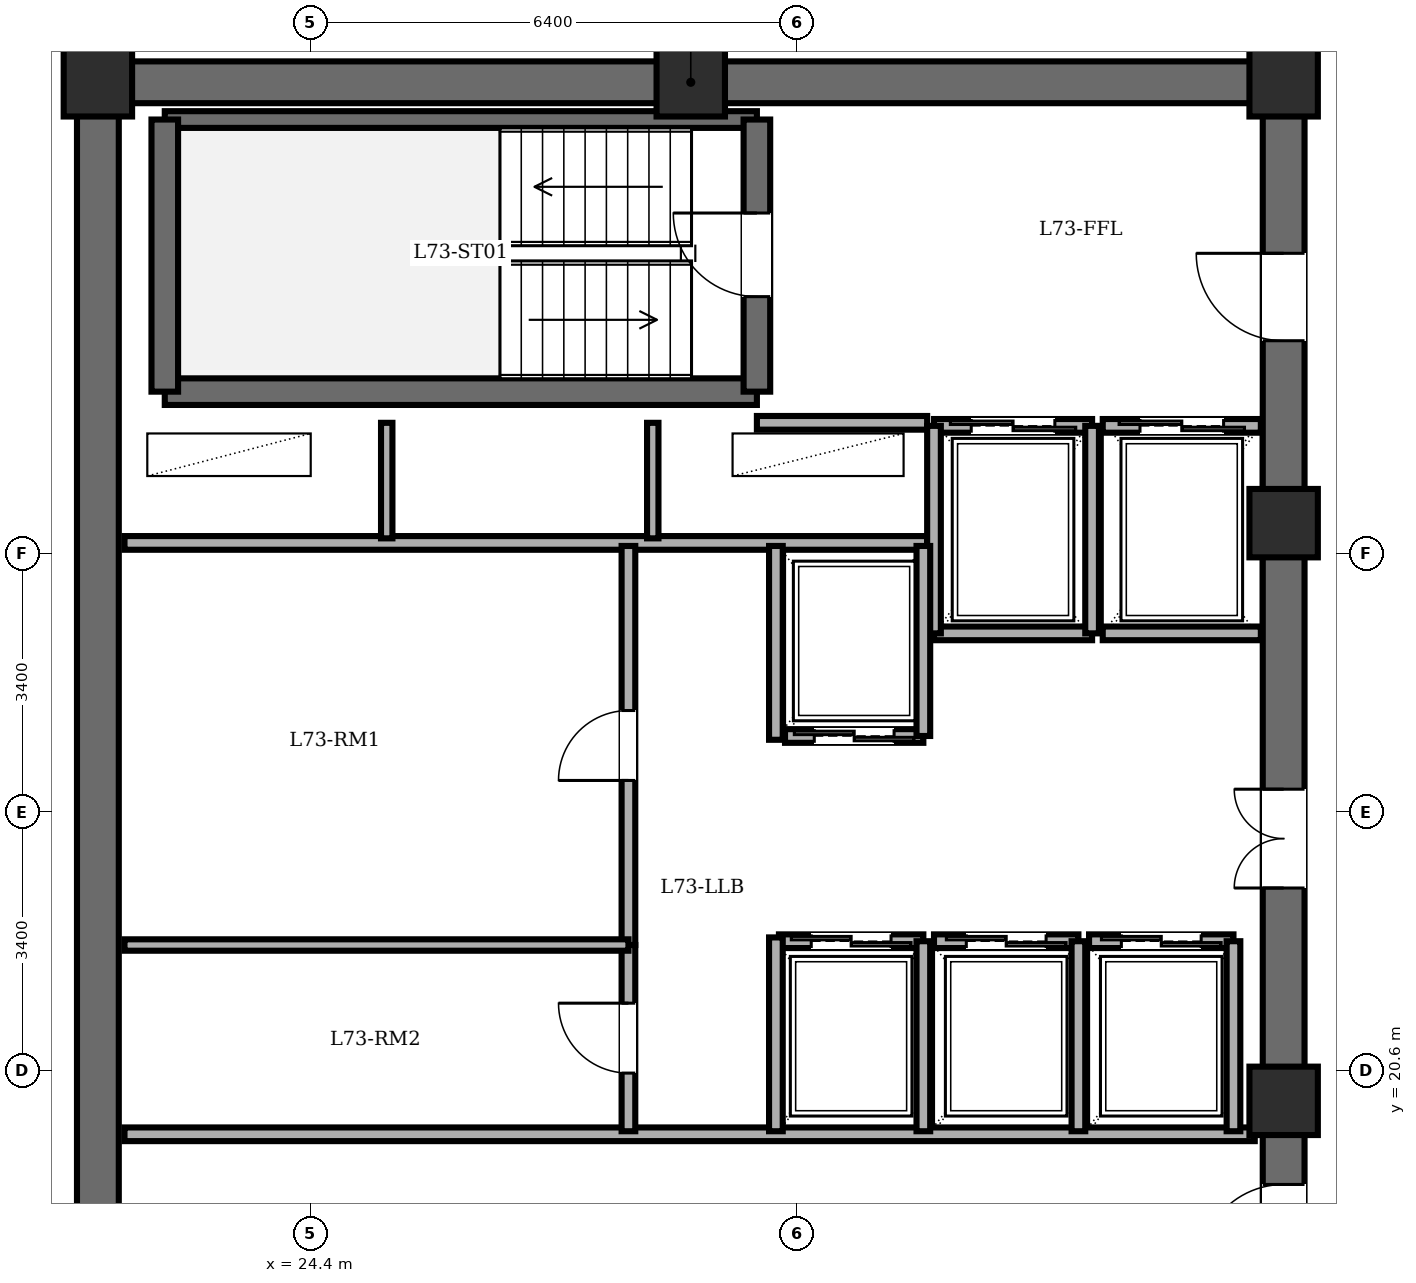
"""IFC4 building model, lengths in metres.
Left out: names, types, materials, properties, quantities, classifications, styles, units other than length and angle.
Written with IfcOpenShell. Run it as: python <this file> out.ifc"""

import sys

from ifc_helpers import new_model, si_unit, direction, frame, frame_2d, origin, origin_2d, place, context, subcontext, project, spatial, rectangle, extrude, element, fill, save


model = new_model("IFC4")
c1 = context("Model", 3, precision=1e-05, world=origin(), true_north=direction((0.0, 1.0)))
c2 = subcontext(c1, "Body", "Model", "MODEL_VIEW")
j1 = project(units=[si_unit("LENGTHUNIT", "METRE"), si_unit("PLANEANGLEUNIT", "RADIAN")], contexts=[c1])
p1 = place(None, origin())
s1 = spatial("IfcSite", under=j1, at=p1, CompositionType="ELEMENT")
p2 = place(p1, origin())
s2 = spatial("IfcBuilding", under=s1, at=p2, CompositionType="ELEMENT")
p3 = place(p2, frame((0.0, 0.0, 280.7)))
s3 = spatial("IfcBuildingStorey", under=s2, at=p3, CompositionType="ELEMENT", Elevation=280.7)
for number, where, z_axis, x_axis in (
    (1, (37.2, 20.2, 0.0), (0.0, 0.0, 1.0), (1.0, 0.0, 0.0)),
    (2, (37.2, 27.8, 0.0), (0.0, 0.0, 1.0), (1.0, 0.0, 0.0)),
    (3, (37.2, 33.6, 0.0), (0.0, 0.0, 1.0), (1.0, 0.0, 0.0)),
    (4, (29.4, 33.6, 0.0), (0.0, 0.0, 1.0), (1.0, 0.0, 0.0)),
    (5, (21.6, 33.6, 0.0), (0.0, 0.0, 1.0), (1.0, 0.0, 0.0)),
):
    element("IfcColumn", number, at=place(p3, frame(where, z_axis=z_axis, x_axis=x_axis)), inside=s3, PredefinedType="COLUMN", context=c2, shape_type="SweptSolid", body=[
        extrude(rectangle(XDim=0.9, YDim=0.9, at=origin_2d()), origin(), (0.0, 0.0, 1.0), 3.65),
    ])
p4 = place(p3, frame((21.6, 14.4, 0.0), z_axis=(0.0, 0.0, 1.0), x_axis=(0.0, 1.0, 0.0)))
e6 = element("IfcWall", 6, at=p4, inside=s3, PredefinedType="SHEAR", context=c2, shape_type="SweptSolid", body=[
    extrude(rectangle(XDim=19.2, YDim=0.55, at=frame_2d((9.6, 0.0))), origin(), (0.0, 0.0, 1.0), 3.45),
])
p5 = place(p3, frame((21.6, 33.6, 0.0), z_axis=(0.0, 0.0, 1.0), x_axis=(1.0, 0.0, 0.0)))
e7 = element("IfcWall", 7, at=p5, inside=s3, PredefinedType="SHEAR", context=c2, shape_type="SweptSolid", body=[
    extrude(rectangle(XDim=15.6, YDim=0.55, at=frame_2d((7.8, 0.0))), origin(), (0.0, 0.0, 1.0), 3.45),
])
p6 = place(p3, frame((37.2, 14.4, 0.0), z_axis=(0.0, 0.0, 1.0), x_axis=(0.0, 1.0, 0.0)))
e8 = element("IfcWall", 8, at=p6, inside=s3, PredefinedType="SHEAR", context=c2, shape_type="SweptSolid", body=[
    extrude(rectangle(XDim=19.2, YDim=0.55, at=frame_2d((9.6, 0.0))), origin(), (0.0, 0.0, 1.0), 3.45),
])
p7 = place(p6, frame((15.8, 0.0, 0.0)))
e9 = element("IfcOpeningElement", 9, at=p7, cuts=e8, PredefinedType="OPENING", context=c2, shape_type="SweptSolid", body=[
    extrude(rectangle(XDim=1.15, YDim=2.15, at=frame_2d((0.575, 1.075))), frame((0.0, 0.285, 0.0), z_axis=(0.0, -1.0, 0.0), x_axis=(1.0, 0.0, 0.0)), (0.0, 0.0, 1.0), 0.57),
])
p8 = place(p6, frame((3.6, 0.0, 0.0)))
e10 = element("IfcOpeningElement", 10, at=p8, cuts=e8, PredefinedType="OPENING", context=c2, shape_type="SweptSolid", body=[
    extrude(rectangle(XDim=1.1, YDim=2.15, at=frame_2d((0.55, 1.075))), frame((0.0, 0.285, 0.0), z_axis=(0.0, -1.0, 0.0), x_axis=(1.0, 0.0, 0.0)), (0.0, 0.0, 1.0), 0.57),
])
p9 = place(p6, frame((8.6, 0.0, 0.0)))
e11 = element("IfcOpeningElement", 11, at=p9, cuts=e8, PredefinedType="OPENING", context=c2, shape_type="SweptSolid", body=[
    extrude(rectangle(XDim=1.3, YDim=2.2, at=frame_2d((0.65, 1.1))), frame((0.0, 0.285, 0.0), z_axis=(0.0, -1.0, 0.0), x_axis=(1.0, 0.0, 0.0)), (0.0, 0.0, 1.0), 0.57),
])
p10 = place(p3, frame((22.48, 29.53, 0.0), z_axis=(0.0, 0.0, 1.0), x_axis=(1.0, 0.0, 0.0)))
e12 = element("IfcWall", 12, at=p10, inside=s3, PredefinedType="SOLIDWALL", context=c2, shape_type="SweptSolid", body=[
    extrude(rectangle(XDim=7.79, YDim=0.35, at=frame_2d((3.895, 0.0))), origin(), (0.0, 0.0, 1.0), 3.45),
])
p11 = place(p3, frame((22.48, 33.11, 0.0), z_axis=(0.0, 0.0, 1.0), x_axis=(1.0, 0.0, 0.0)))
e13 = element("IfcWall", 13, at=p11, inside=s3, PredefinedType="PARTITIONING", context=c2, shape_type="SweptSolid", body=[
    extrude(rectangle(XDim=7.79, YDim=0.22, at=frame_2d((3.895, 0.0))), origin(), (0.0, 0.0, 1.0), 3.45),
])
p12 = place(p3, frame((22.48, 29.53, 0.0), z_axis=(0.0, 0.0, 1.0), x_axis=(0.0, 1.0, 0.0)))
e14 = element("IfcWall", 14, at=p12, inside=s3, PredefinedType="SOLIDWALL", context=c2, shape_type="SweptSolid", body=[
    extrude(rectangle(XDim=3.58, YDim=0.35, at=frame_2d((1.79, 0.0))), origin(), (0.0, 0.0, 1.0), 3.45),
])
p13 = place(p3, frame((30.27, 29.53, 0.0), z_axis=(0.0, 0.0, 1.0), x_axis=(0.0, 1.0, 0.0)))
e15 = element("IfcWall", 15, at=p13, inside=s3, PredefinedType="SOLIDWALL", context=c2, shape_type="SweptSolid", body=[
    extrude(rectangle(XDim=3.58, YDim=0.35, at=frame_2d((1.79, 0.0))), origin(), (0.0, 0.0, 1.0), 3.45),
])
p14 = place(p13, frame((1.25, 0.0, 0.0)))
e16 = element("IfcOpeningElement", 16, at=p14, cuts=e15, PredefinedType="OPENING", context=c2, shape_type="SweptSolid", body=[
    extrude(rectangle(XDim=1.1, YDim=2.15, at=frame_2d((0.55, 1.075))), frame((0.0, 0.185, 0.0), z_axis=(0.0, -1.0, 0.0), x_axis=(1.0, 0.0, 0.0)), (0.0, 0.0, 1.0), 0.37),
])
p15 = place(p3, frame((30.27, 29.12, 0.0), z_axis=(0.0, 0.0, 1.0), x_axis=(1.0, 0.0, 0.0)))
e17 = element("IfcWall", 17, at=p15, inside=s3, PredefinedType="PARTITIONING", context=c2, shape_type="SweptSolid", body=[
    extrude(rectangle(XDim=2.24, YDim=0.18, at=frame_2d((1.12, 0.0))), origin(), (0.0, 0.0, 1.0), 3.45),
])
p16 = place(p3, frame((21.95, 27.54, 0.0), z_axis=(0.0, 0.0, 1.0), x_axis=(1.0, 0.0, 0.0)))
e18 = element("IfcWall", 18, at=p16, inside=s3, PredefinedType="PARTITIONING", context=c2, shape_type="SweptSolid", body=[
    extrude(rectangle(XDim=10.56, YDim=0.18, at=frame_2d((5.28, 0.0))), origin(), (0.0, 0.0, 1.0), 3.45),
])
for number, where, z_axis, x_axis in (
    (19, (25.4, 27.6, 0.0), (0.0, 0.0, 1.0), (0.0, 1.0, 0.0)),
    (20, (28.9, 27.6, 0.0), (0.0, 0.0, 1.0), (0.0, 1.0, 0.0)),
):
    element("IfcWall", number, at=place(p3, frame(where, z_axis=z_axis, x_axis=x_axis)), inside=s3, PredefinedType="PARTITIONING", context=c2, shape_type="SweptSolid", body=[
        extrude(rectangle(XDim=1.52, YDim=0.15, at=frame_2d((0.76, 0.0))), origin(), (0.0, 0.0, 1.0), 3.45),
    ])
p17 = place(p3, frame((21.95, 19.76, 0.0), z_axis=(0.0, 0.0, 1.0), x_axis=(1.0, 0.0, 0.0)))
e21 = element("IfcWall", 21, at=p17, inside=s3, PredefinedType="PARTITIONING", context=c2, shape_type="SweptSolid", body=[
    extrude(rectangle(XDim=14.87, YDim=0.18, at=frame_2d((7.435, 0.0))), origin(), (0.0, 0.0, 1.0), 3.45),
])
p18 = place(p3, frame((32.6, 29.08, 0.0), z_axis=(0.0, 0.0, 1.0), x_axis=(1.0, 0.0, 0.0)))
e22 = element("IfcWall", 22, at=p18, inside=s3, PredefinedType="PARTITIONING", context=c2, shape_type="SweptSolid", body=[
    extrude(rectangle(XDim=2.08, YDim=0.18, at=frame_2d((1.04, 0.0))), origin(), (0.0, 0.0, 1.0), 3.45),
])
p19 = place(p18, frame((0.49, 0.0, 0.0)))
e23 = element("IfcOpeningElement", 23, at=p19, cuts=e22, PredefinedType="OPENING", context=c2, shape_type="SweptSolid", body=[
    extrude(rectangle(XDim=1.1, YDim=2.2, at=frame_2d((0.55, 1.1))), frame((0.0, 0.1, 0.0), z_axis=(0.0, -1.0, 0.0), x_axis=(1.0, 0.0, 0.0)), (0.0, 0.0, 1.0), 0.2),
])
p20 = place(p3, frame((34.68, 26.35, 0.0), z_axis=(0.0, 0.0, 1.0), x_axis=(-1.0, 0.0, 0.0)))
e24 = element("IfcWall", 24, at=p20, inside=s3, PredefinedType="PARTITIONING", context=c2, shape_type="SweptSolid", body=[
    extrude(rectangle(XDim=2.08, YDim=0.18, at=frame_2d((1.04, 0.0))), origin(), (0.0, 0.0, 1.0), 3.45),
])
for number, where, z_axis, x_axis in (
    (25, (34.68, 26.35, 0.0), (0.0, 0.0, 1.0), (0.0, 1.0, 0.0)),
    (26, (32.6, 29.08, 0.0), (0.0, 0.0, 1.0), (0.0, -1.0, 0.0)),
):
    element("IfcWall", number, at=place(p3, frame(where, z_axis=z_axis, x_axis=x_axis)), inside=s3, PredefinedType="PARTITIONING", context=c2, shape_type="SweptSolid", body=[
        extrude(rectangle(XDim=2.73, YDim=0.18, at=frame_2d((1.365, 0.0))), origin(), (0.0, 0.0, 1.0), 3.45),
    ])
p21 = place(p3, frame((34.82, 29.08, 0.0), z_axis=(0.0, 0.0, 1.0), x_axis=(1.0, 0.0, 0.0)))
e27 = element("IfcWall", 27, at=p21, inside=s3, PredefinedType="PARTITIONING", context=c2, shape_type="SweptSolid", body=[
    extrude(rectangle(XDim=2.08, YDim=0.18, at=frame_2d((1.04, 0.0))), origin(), (0.0, 0.0, 1.0), 3.45),
])
p22 = place(p21, frame((0.49, 0.0, 0.0)))
e28 = element("IfcOpeningElement", 28, at=p22, cuts=e27, PredefinedType="OPENING", context=c2, shape_type="SweptSolid", body=[
    extrude(rectangle(XDim=1.1, YDim=2.2, at=frame_2d((0.55, 1.1))), frame((0.0, 0.1, 0.0), z_axis=(0.0, -1.0, 0.0), x_axis=(1.0, 0.0, 0.0)), (0.0, 0.0, 1.0), 0.2),
])
p23 = place(p3, frame((36.9, 26.35, 0.0), z_axis=(0.0, 0.0, 1.0), x_axis=(-1.0, 0.0, 0.0)))
e29 = element("IfcWall", 29, at=p23, inside=s3, PredefinedType="PARTITIONING", context=c2, shape_type="SweptSolid", body=[
    extrude(rectangle(XDim=2.08, YDim=0.18, at=frame_2d((1.04, 0.0))), origin(), (0.0, 0.0, 1.0), 3.45),
])
p24 = place(p3, frame((32.46, 25.0, 0.0), z_axis=(0.0, 0.0, 1.0), x_axis=(-1.0, 0.0, 0.0)))
e30 = element("IfcWall", 30, at=p24, inside=s3, PredefinedType="PARTITIONING", context=c2, shape_type="SweptSolid", body=[
    extrude(rectangle(XDim=1.82, YDim=0.18, at=frame_2d((0.91, 0.0))), origin(), (0.0, 0.0, 1.0), 3.45),
])
p25 = place(p24, frame((0.385, 0.0, 0.0)))
e31 = element("IfcOpeningElement", 31, at=p25, cuts=e30, PredefinedType="OPENING", context=c2, shape_type="SweptSolid", body=[
    extrude(rectangle(XDim=1.05, YDim=2.2, at=frame_2d((0.525, 1.1))), frame((0.0, 0.1, 0.0), z_axis=(0.0, -1.0, 0.0), x_axis=(1.0, 0.0, 0.0)), (0.0, 0.0, 1.0), 0.2),
])
p26 = place(p3, frame((32.46, 25.0, 0.0), z_axis=(0.0, 0.0, 1.0), x_axis=(0.0, 1.0, 0.0)))
e32 = element("IfcWall", 32, at=p26, inside=s3, PredefinedType="PARTITIONING", context=c2, shape_type="SweptSolid", body=[
    extrude(rectangle(XDim=2.5, YDim=0.18, at=frame_2d((1.25, 0.0))), origin(), (0.0, 0.0, 1.0), 3.45),
])
p27 = place(p3, frame((30.56, 22.3, 0.0), z_axis=(0.0, 0.0, 1.0), x_axis=(1.0, 0.0, 0.0)))
e33 = element("IfcWall", 33, at=p27, inside=s3, PredefinedType="PARTITIONING", context=c2, shape_type="SweptSolid", body=[
    extrude(rectangle(XDim=1.9, YDim=0.18, at=frame_2d((0.95, 0.0))), origin(), (0.0, 0.0, 1.0), 3.45),
])
p28 = place(p27, frame((0.425, 0.0, 0.0)))
e34 = element("IfcOpeningElement", 34, at=p28, cuts=e33, PredefinedType="OPENING", context=c2, shape_type="SweptSolid", body=[
    extrude(rectangle(XDim=1.05, YDim=2.2, at=frame_2d((0.525, 1.1))), frame((0.0, 0.1, 0.0), z_axis=(0.0, -1.0, 0.0), x_axis=(1.0, 0.0, 0.0)), (0.0, 0.0, 1.0), 0.2),
])
p29 = place(p3, frame((32.46, 19.8, 0.0), z_axis=(0.0, 0.0, 1.0), x_axis=(0.0, 1.0, 0.0)))
e35 = element("IfcWall", 35, at=p29, inside=s3, PredefinedType="PARTITIONING", context=c2, shape_type="SweptSolid", body=[
    extrude(rectangle(XDim=2.5, YDim=0.18, at=frame_2d((1.25, 0.0))), origin(), (0.0, 0.0, 1.0), 3.45),
])
p30 = place(p3, frame((32.6, 22.3, 0.0), z_axis=(0.0, 0.0, 1.0), x_axis=(1.0, 0.0, 0.0)))
e36 = element("IfcWall", 36, at=p30, inside=s3, PredefinedType="PARTITIONING", context=c2, shape_type="SweptSolid", body=[
    extrude(rectangle(XDim=1.9, YDim=0.18, at=frame_2d((0.95, 0.0))), origin(), (0.0, 0.0, 1.0), 3.45),
])
p31 = place(p30, frame((0.425, 0.0, 0.0)))
e37 = element("IfcOpeningElement", 37, at=p31, cuts=e36, PredefinedType="OPENING", context=c2, shape_type="SweptSolid", body=[
    extrude(rectangle(XDim=1.05, YDim=2.2, at=frame_2d((0.525, 1.1))), frame((0.0, 0.1, 0.0), z_axis=(0.0, -1.0, 0.0), x_axis=(1.0, 0.0, 0.0)), (0.0, 0.0, 1.0), 0.2),
])
p32 = place(p3, frame((34.5, 19.8, 0.0), z_axis=(0.0, 0.0, 1.0), x_axis=(0.0, 1.0, 0.0)))
e38 = element("IfcWall", 38, at=p32, inside=s3, PredefinedType="PARTITIONING", context=c2, shape_type="SweptSolid", body=[
    extrude(rectangle(XDim=2.5, YDim=0.18, at=frame_2d((1.25, 0.0))), origin(), (0.0, 0.0, 1.0), 3.45),
])
p33 = place(p3, frame((34.64, 22.3, 0.0), z_axis=(0.0, 0.0, 1.0), x_axis=(1.0, 0.0, 0.0)))
e39 = element("IfcWall", 39, at=p33, inside=s3, PredefinedType="PARTITIONING", context=c2, shape_type="SweptSolid", body=[
    extrude(rectangle(XDim=1.9, YDim=0.18, at=frame_2d((0.95, 0.0))), origin(), (0.0, 0.0, 1.0), 3.45),
])
p34 = place(p33, frame((0.425, 0.0, 0.0)))
e40 = element("IfcOpeningElement", 40, at=p34, cuts=e39, PredefinedType="OPENING", context=c2, shape_type="SweptSolid", body=[
    extrude(rectangle(XDim=1.05, YDim=2.2, at=frame_2d((0.525, 1.1))), frame((0.0, 0.1, 0.0), z_axis=(0.0, -1.0, 0.0), x_axis=(1.0, 0.0, 0.0)), (0.0, 0.0, 1.0), 0.2),
])
p35 = place(p3, frame((36.54, 19.8, 0.0), z_axis=(0.0, 0.0, 1.0), x_axis=(0.0, 1.0, 0.0)))
e41 = element("IfcWall", 41, at=p35, inside=s3, PredefinedType="PARTITIONING", context=c2, shape_type="SweptSolid", body=[
    extrude(rectangle(XDim=2.5, YDim=0.18, at=frame_2d((1.25, 0.0))), origin(), (0.0, 0.0, 1.0), 3.45),
])
for number, where, z_axis, x_axis in (
    (42, (30.52, 24.95, 0.0), (0.0, 0.0, 1.0), (0.0, 1.0, 0.0)),
    (43, (30.52, 19.8, 0.0), (0.0, 0.0, 1.0), (0.0, 1.0, 0.0)),
):
    element("IfcWall", number, at=place(p3, frame(where, z_axis=z_axis, x_axis=x_axis)), inside=s3, PredefinedType="PARTITIONING", context=c2, shape_type="SweptSolid", body=[
        extrude(rectangle(XDim=2.55, YDim=0.18, at=frame_2d((1.275, 0.0))), origin(), (0.0, 0.0, 1.0), 3.45),
    ])
p36 = place(p3, frame((28.58, 22.25, 0.0), z_axis=(0.0, 0.0, 1.0), x_axis=(0.0, 1.0, 0.0)))
e44 = element("IfcWall", 44, at=p36, inside=s3, PredefinedType="PARTITIONING", context=c2, shape_type="SweptSolid", body=[
    extrude(rectangle(XDim=5.25, YDim=0.18, at=frame_2d((2.625, 0.0))), origin(), (0.0, 0.0, 1.0), 3.45),
])
p37 = place(p36, frame((2.165, 0.0, 0.0)))
e45 = element("IfcOpeningElement", 45, at=p37, cuts=e44, PredefinedType="OPENING", context=c2, shape_type="SweptSolid", body=[
    extrude(rectangle(XDim=0.92, YDim=2.1, at=frame_2d((0.46, 1.05))), frame((0.0, 0.1, 0.0), z_axis=(0.0, -1.0, 0.0), x_axis=(1.0, 0.0, 0.0)), (0.0, 0.0, 1.0), 0.2),
])
p38 = place(p3, frame((28.58, 19.8, 0.0), z_axis=(0.0, 0.0, 1.0), x_axis=(0.0, 1.0, 0.0)))
e46 = element("IfcWall", 46, at=p38, inside=s3, PredefinedType="PARTITIONING", context=c2, shape_type="SweptSolid", body=[
    extrude(rectangle(XDim=2.45, YDim=0.18, at=frame_2d((1.225, 0.0))), origin(), (0.0, 0.0, 1.0), 3.45),
])
p39 = place(p38, frame((0.765, 0.0, 0.0)))
e47 = element("IfcOpeningElement", 47, at=p39, cuts=e46, PredefinedType="OPENING", context=c2, shape_type="SweptSolid", body=[
    extrude(rectangle(XDim=0.92, YDim=2.1, at=frame_2d((0.46, 1.05))), frame((0.0, 0.1, 0.0), z_axis=(0.0, -1.0, 0.0), x_axis=(1.0, 0.0, 0.0)), (0.0, 0.0, 1.0), 0.2),
])
p40 = place(p3, frame((21.95, 22.25, 0.0), z_axis=(0.0, 0.0, 1.0), x_axis=(1.0, 0.0, 0.0)))
e48 = element("IfcWall", 48, at=p40, inside=s3, PredefinedType="PARTITIONING", context=c2, shape_type="SweptSolid", body=[
    extrude(rectangle(XDim=6.63, YDim=0.15, at=frame_2d((3.315, 0.0))), origin(), (0.0, 0.0, 1.0), 3.45),
])
p41 = place(p14, origin())
e49 = element("IfcDoor", 49, at=p41, inside=s3, OperationType="SINGLE_SWING_RIGHT", PredefinedType="DOOR", context=c2, shape_type="SweptSolid", body=[
    extrude(rectangle(XDim=1.1, YDim=2.15, at=frame_2d((0.55, 1.075))), frame((0.0, 0.025, 0.0), z_axis=(0.0, -1.0, 0.0), x_axis=(1.0, 0.0, 0.0)), (0.0, 0.0, 1.0), 0.05),
])
fill(e16, e49)
p42 = place(p7, origin())
e50 = element("IfcDoor", 50, at=p42, inside=s3, OperationType="SINGLE_SWING_RIGHT", PredefinedType="DOOR", context=c2, shape_type="SweptSolid", body=[
    extrude(rectangle(XDim=1.15, YDim=2.15, at=frame_2d((0.575, 1.075))), frame((0.0, 0.025, 0.0), z_axis=(0.0, -1.0, 0.0), x_axis=(1.0, 0.0, 0.0)), (0.0, 0.0, 1.0), 0.05),
])
fill(e9, e50)
p43 = place(p8, origin())
e51 = element("IfcDoor", 51, at=p43, inside=s3, OperationType="SINGLE_SWING_LEFT", PredefinedType="DOOR", context=c2, shape_type="SweptSolid", body=[
    extrude(rectangle(XDim=1.1, YDim=2.15, at=frame_2d((0.55, 1.075))), frame((0.0, 0.025, 0.0), z_axis=(0.0, -1.0, 0.0), x_axis=(1.0, 0.0, 0.0)), (0.0, 0.0, 1.0), 0.05),
])
fill(e10, e51)
p44 = place(p19, origin())
e52 = element("IfcDoor", 52, at=p44, inside=s3, OperationType="DOUBLE_DOOR_SLIDING", PredefinedType="DOOR", context=c2, shape_type="SweptSolid", body=[
    extrude(rectangle(XDim=1.1, YDim=2.2, at=frame_2d((0.55, 1.1))), frame((0.0, 0.025, 0.0), z_axis=(0.0, -1.0, 0.0), x_axis=(1.0, 0.0, 0.0)), (0.0, 0.0, 1.0), 0.05),
])
fill(e23, e52)
p45 = place(p22, origin())
e53 = element("IfcDoor", 53, at=p45, inside=s3, OperationType="DOUBLE_DOOR_SLIDING", PredefinedType="DOOR", context=c2, shape_type="SweptSolid", body=[
    extrude(rectangle(XDim=1.1, YDim=2.2, at=frame_2d((0.55, 1.1))), frame((0.0, 0.025, 0.0), z_axis=(0.0, -1.0, 0.0), x_axis=(1.0, 0.0, 0.0)), (0.0, 0.0, 1.0), 0.05),
])
fill(e28, e53)
p46 = place(p25, origin())
e54 = element("IfcDoor", 54, at=p46, inside=s3, OperationType="DOUBLE_DOOR_SLIDING", PredefinedType="DOOR", context=c2, shape_type="SweptSolid", body=[
    extrude(rectangle(XDim=1.05, YDim=2.2, at=frame_2d((0.525, 1.1))), frame((0.0, 0.025, 0.0), z_axis=(0.0, -1.0, 0.0), x_axis=(1.0, 0.0, 0.0)), (0.0, 0.0, 1.0), 0.05),
])
fill(e31, e54)
p47 = place(p28, origin())
e55 = element("IfcDoor", 55, at=p47, inside=s3, OperationType="DOUBLE_DOOR_SLIDING", PredefinedType="DOOR", context=c2, shape_type="SweptSolid", body=[
    extrude(rectangle(XDim=1.05, YDim=2.2, at=frame_2d((0.525, 1.1))), frame((0.0, 0.025, 0.0), z_axis=(0.0, -1.0, 0.0), x_axis=(1.0, 0.0, 0.0)), (0.0, 0.0, 1.0), 0.05),
])
fill(e34, e55)
p48 = place(p31, origin())
e56 = element("IfcDoor", 56, at=p48, inside=s3, OperationType="DOUBLE_DOOR_SLIDING", PredefinedType="DOOR", context=c2, shape_type="SweptSolid", body=[
    extrude(rectangle(XDim=1.05, YDim=2.2, at=frame_2d((0.525, 1.1))), frame((0.0, 0.025, 0.0), z_axis=(0.0, -1.0, 0.0), x_axis=(1.0, 0.0, 0.0)), (0.0, 0.0, 1.0), 0.05),
])
fill(e37, e56)
p49 = place(p34, origin())
e57 = element("IfcDoor", 57, at=p49, inside=s3, OperationType="DOUBLE_DOOR_SLIDING", PredefinedType="DOOR", context=c2, shape_type="SweptSolid", body=[
    extrude(rectangle(XDim=1.05, YDim=2.2, at=frame_2d((0.525, 1.1))), frame((0.0, 0.025, 0.0), z_axis=(0.0, -1.0, 0.0), x_axis=(1.0, 0.0, 0.0)), (0.0, 0.0, 1.0), 0.05),
])
fill(e40, e57)
p50 = place(p37, origin())
e58 = element("IfcDoor", 58, at=p50, inside=s3, OperationType="SINGLE_SWING_LEFT", PredefinedType="DOOR", context=c2, shape_type="SweptSolid", body=[
    extrude(rectangle(XDim=0.92, YDim=2.1, at=frame_2d((0.46, 1.05))), frame((0.0, 0.025, 0.0), z_axis=(0.0, -1.0, 0.0), x_axis=(1.0, 0.0, 0.0)), (0.0, 0.0, 1.0), 0.05),
])
fill(e45, e58)
p51 = place(p39, origin())
e59 = element("IfcDoor", 59, at=p51, inside=s3, OperationType="SINGLE_SWING_RIGHT", PredefinedType="DOOR", context=c2, shape_type="SweptSolid", body=[
    extrude(rectangle(XDim=0.92, YDim=2.1, at=frame_2d((0.46, 1.05))), frame((0.0, 0.025, 0.0), z_axis=(0.0, -1.0, 0.0), x_axis=(1.0, 0.0, 0.0)), (0.0, 0.0, 1.0), 0.05),
])
fill(e47, e59)
p52 = place(p9, origin())
e60 = element("IfcDoor", 60, at=p52, inside=s3, OperationType="DOUBLE_DOOR_SINGLE_SWING", PredefinedType="DOOR", context=c2, shape_type="SweptSolid", body=[
    extrude(rectangle(XDim=1.3, YDim=2.2, at=frame_2d((0.65, 1.1))), frame((0.0, 0.025, 0.0), z_axis=(0.0, -1.0, 0.0), x_axis=(1.0, 0.0, 0.0)), (0.0, 0.0, 1.0), 0.05),
])
fill(e11, e60)
save(model, sys.argv[1])
